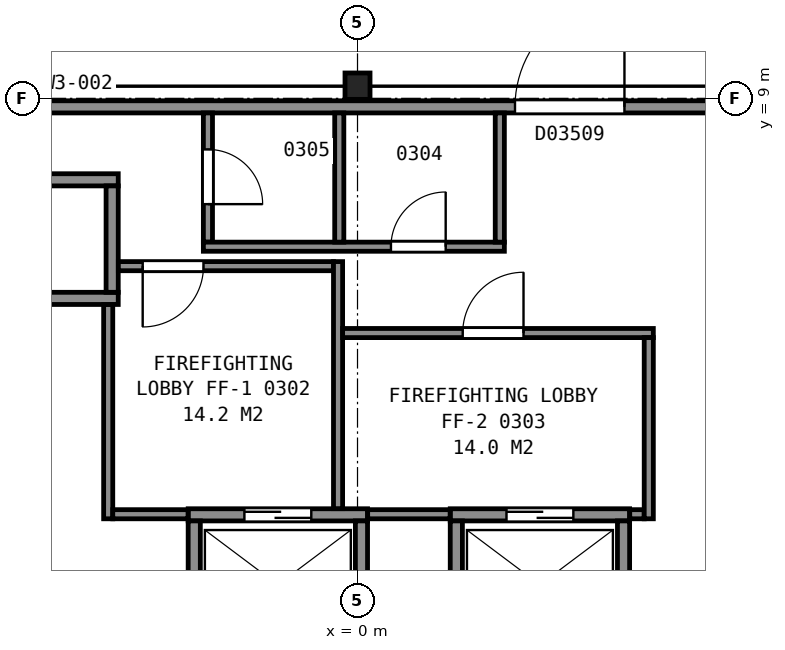
"""IFC4 building model, lengths in metres.
Left out: names, types, materials, properties, quantities, classifications, styles, units other than length and angle.
Written with IfcOpenShell. Run it as: python <this file> out.ifc"""

import sys

from ifc_helpers import new_model, si_unit, direction, frame, frame_2d, origin, origin_2d, place, context, subcontext, project, spatial, rectangle, i_section, extrude, element, fill, save


model = new_model("IFC4")
c1 = context("Model", 3, precision=1e-05, world=origin(), true_north=direction((0.0, 1.0)))
c2 = subcontext(c1, "Body", "Model", "MODEL_VIEW")
j1 = project(units=[si_unit("LENGTHUNIT", "METRE"), si_unit("PLANEANGLEUNIT", "RADIAN")], contexts=[c1])
p1 = place(None, origin())
s1 = spatial("IfcSite", under=j1, at=p1, CompositionType="ELEMENT")
p2 = place(p1, origin())
s2 = spatial("IfcBuilding", under=s1, at=p2, CompositionType="ELEMENT")
p3 = place(p2, frame((0.0, 0.0, 22.4)))
s3 = spatial("IfcBuildingStorey", under=s2, at=p3, CompositionType="ELEMENT", Elevation=22.4)
p4 = place(p3, frame((0.0, 9.2, 0.0), z_axis=(0.0, 0.0, 1.0), x_axis=(1.0, 0.0, 0.0)))
e1 = element("IfcColumn", 1, at=p4, inside=s3, PredefinedType="COLUMN", context=c2, shape_type="SweptSolid", body=[
    extrude(i_section(OverallWidth=0.411, OverallDepth=0.434, WebThickness=0.036, FlangeThickness=0.057, FilletRadius=0.015, at=origin_2d()), origin(), (0.0, 0.0, 1.0), 4.8),
])
p5 = place(p3, frame((-2.785, 2.15, 0.0), z_axis=(0.0, 0.0, 1.0), x_axis=(1.0, 0.0, 0.0)))
e2 = element("IfcWall", 2, at=p5, inside=s3, PredefinedType="PARTITIONING", context=c2, shape_type="SweptSolid", body=[
    extrude(rectangle(XDim=2.95, YDim=0.2, at=frame_2d((1.475, 0.0))), origin(), (0.0, 0.0, 1.0), 4.8),
])
p6 = place(p5, frame((0.925, 0.0, 0.0)))
e3 = element("IfcOpeningElement", 3, at=p6, cuts=e2, PredefinedType="OPENING", context=c2, shape_type="SweptSolid", body=[
    extrude(rectangle(XDim=1.1, YDim=2.1, at=frame_2d((0.55, 1.05))), frame((0.0, 0.11, 0.0), z_axis=(0.0, -1.0, 0.0), x_axis=(1.0, 0.0, 0.0)), (0.0, 0.0, 1.0), 0.22),
])
p7 = place(p3, frame((1.525, 2.15, 0.0), z_axis=(0.0, 0.0, 1.0), x_axis=(1.0, 0.0, 0.0)))
e4 = element("IfcWall", 4, at=p7, inside=s3, PredefinedType="PARTITIONING", context=c2, shape_type="SweptSolid", body=[
    extrude(rectangle(XDim=2.95, YDim=0.2, at=frame_2d((1.475, 0.0))), origin(), (0.0, 0.0, 1.0), 4.8),
])
p8 = place(p7, frame((0.925, 0.0, 0.0)))
e5 = element("IfcOpeningElement", 5, at=p8, cuts=e4, PredefinedType="OPENING", context=c2, shape_type="SweptSolid", body=[
    extrude(rectangle(XDim=1.1, YDim=2.1, at=frame_2d((0.55, 1.05))), frame((0.0, 0.11, 0.0), z_axis=(0.0, -1.0, 0.0), x_axis=(1.0, 0.0, 0.0)), (0.0, 0.0, 1.0), 0.22),
])
for number, where, z_axis, x_axis in (
    (6, (-6.285, 5.71, 0.0), (0.0, 0.0, 1.0), (1.0, 0.0, 0.0)),
    (7, (-6.285, 7.66, 0.0), (0.0, 0.0, 1.0), (1.0, 0.0, 0.0)),
):
    element("IfcWall", number, at=place(p3, frame(where, z_axis=z_axis, x_axis=x_axis)), inside=s3, PredefinedType="PARTITIONING", context=c2, shape_type="SweptSolid", body=[
        extrude(rectangle(XDim=2.35, YDim=0.2, at=frame_2d((1.175, 0.0))), origin(), (0.0, 0.0, 1.0), 4.8),
    ])
p9 = place(p3, frame((5.663, -1.612, 0.0), z_axis=(0.0, 0.0, 1.0), x_axis=(0.49998122708, 0.866036242063, 0.0)))
e8 = element("IfcWall", 8, at=p9, inside=s3, PredefinedType="PARTITIONING", context=c2, shape_type="SweptSolid", body=[
    extrude(rectangle(XDim=4.9, YDim=0.2, at=frame_2d((2.45, 0.0))), origin(), (0.0, 0.0, 1.0), 4.8),
])
for number, where, z_axis, x_axis in (
    (9, (4.375, 0.1, 0.0), (0.0, 0.0, 1.0), (0.0, 1.0, 0.0)),
    (10, (1.625, 0.1, 0.0), (0.0, 0.0, 1.0), (0.0, 1.0, 0.0)),
    (11, (0.065, 0.1, 0.0), (0.0, 0.0, 1.0), (0.0, 1.0, 0.0)),
    (12, (-2.685, 0.1, 0.0), (0.0, 0.0, 1.0), (0.0, 1.0, 0.0)),
):
    element("IfcWall", number, at=place(p3, frame(where, z_axis=z_axis, x_axis=x_axis)), inside=s3, PredefinedType="PARTITIONING", context=c2, shape_type="SweptSolid", body=[
        extrude(rectangle(XDim=1.95, YDim=0.2, at=frame_2d((0.975, 0.0))), origin(), (0.0, 0.0, 1.0), 4.8),
    ])
p10 = place(p3, frame((-4.035, 5.81, 0.0), z_axis=(0.0, 0.0, 1.0), x_axis=(0.0, 1.0, 0.0)))
e13 = element("IfcWall", 13, at=p10, inside=s3, PredefinedType="PARTITIONING", context=c2, shape_type="SweptSolid", body=[
    extrude(rectangle(XDim=1.75, YDim=0.2, at=frame_2d((0.875, 0.0))), origin(), (0.0, 0.0, 1.0), 4.8),
])
p11 = place(p3, frame((11.986, 8.86, 0.0), z_axis=(0.0, 0.0, 1.0), x_axis=(-1.0, 0.0, 0.0)))
e14 = element("IfcWall", 14, at=p11, inside=s3, PredefinedType="PARTITIONING", context=c2, shape_type="SweptSolid", body=[
    extrude(rectangle(XDim=23.967, YDim=0.2, at=frame_2d((11.983, 0.0))), origin(), (0.0, 0.0, 1.0), 4.55),
])
p12 = place(p11, frame((7.596, 0.0, 0.0)))
e15 = element("IfcOpeningElement", 15, at=p12, cuts=e14, PredefinedType="OPENING", context=c2, shape_type="SweptSolid", body=[
    extrude(rectangle(XDim=1.8, YDim=2.1, at=frame_2d((0.9, 1.05))), frame((0.0, 0.11, 0.0), z_axis=(0.0, -1.0, 0.0), x_axis=(1.0, 0.0, 0.0)), (0.0, 0.0, 1.0), 0.22),
])
p13 = place(p3, frame((-4.1, 2.085, 0.0), z_axis=(0.0, 0.0, 1.0), x_axis=(0.0, 1.0, 0.0)))
e16 = element("IfcWall", 16, at=p13, inside=s3, PredefinedType="PARTITIONING", context=c2, shape_type="SweptSolid", body=[
    extrude(rectangle(XDim=3.523, YDim=0.15, at=frame_2d((1.761, 0.0))), origin(), (0.0, 0.0, 1.0), 4.55),
])
p14 = place(p3, frame((-4.025, 2.16, 0.0), z_axis=(0.0, 0.0, 1.0), x_axis=(1.0, 0.0, 0.0)))
e17 = element("IfcWall", 17, at=p14, inside=s3, PredefinedType="PARTITIONING", context=c2, shape_type="SweptSolid", body=[
    extrude(rectangle(XDim=1.238, YDim=0.15, at=frame_2d((0.619, 0.0))), origin(), (0.0, 0.0, 1.0), 4.55),
])
p15 = place(p3, frame((-3.933, 6.24, 0.0), z_axis=(0.0, 0.0, 1.0), x_axis=(1.0, 0.0, 0.0)))
e18 = element("IfcWall", 18, at=p15, inside=s3, PredefinedType="PARTITIONING", context=c2, shape_type="SweptSolid", body=[
    extrude(rectangle(XDim=3.538, YDim=0.15, at=frame_2d((1.769, 0.0))), origin(), (0.0, 0.0, 1.0), 4.55),
])
p16 = place(p15, frame((0.4, 0.0, 0.0)))
e19 = element("IfcOpeningElement", 19, at=p16, cuts=e18, PredefinedType="OPENING", context=c2, shape_type="SweptSolid", body=[
    extrude(rectangle(XDim=1.0, YDim=2.1, at=frame_2d((0.5, 1.05))), frame((0.0, 0.085, 0.0), z_axis=(0.0, -1.0, 0.0), x_axis=(1.0, 0.0, 0.0)), (0.0, 0.0, 1.0), 0.17),
])
p17 = place(p3, frame((-2.46, 8.76, 0.0), z_axis=(0.0, 0.0, 1.0), x_axis=(0.0, -1.0, 0.0)))
e20 = element("IfcWall", 20, at=p17, inside=s3, PredefinedType="PARTITIONING", context=c2, shape_type="SweptSolid", body=[
    extrude(rectangle(XDim=2.125, YDim=0.15, at=frame_2d((1.062, 0.0))), origin(), (0.0, 0.0, 1.0), 4.55),
])
p18 = place(p17, frame((0.6, 0.0, 0.0)))
e21 = element("IfcOpeningElement", 21, at=p18, cuts=e20, PredefinedType="OPENING", context=c2, shape_type="SweptSolid", body=[
    extrude(rectangle(XDim=0.9, YDim=2.1, at=frame_2d((0.45, 1.05))), frame((0.0, 0.085, 0.0), z_axis=(0.0, -1.0, 0.0), x_axis=(1.0, 0.0, 0.0)), (0.0, 0.0, 1.0), 0.17),
])
p19 = place(p3, frame((-2.535, 6.56, 0.0), z_axis=(0.0, 0.0, 1.0), x_axis=(1.0, 0.0, 0.0)))
e22 = element("IfcWall", 22, at=p19, inside=s3, PredefinedType="PARTITIONING", context=c2, shape_type="SweptSolid", body=[
    extrude(rectangle(XDim=4.95, YDim=0.15, at=frame_2d((2.475, 0.0))), origin(), (0.0, 0.0, 1.0), 4.55),
])
p20 = place(p19, frame((3.085, 0.0, 0.0)))
e23 = element("IfcOpeningElement", 23, at=p20, cuts=e22, PredefinedType="OPENING", context=c2, shape_type="SweptSolid", body=[
    extrude(rectangle(XDim=0.9, YDim=2.1, at=frame_2d((0.45, 1.05))), frame((0.0, 0.085, 0.0), z_axis=(0.0, -1.0, 0.0), x_axis=(1.0, 0.0, 0.0)), (0.0, 0.0, 1.0), 0.17),
])
p21 = place(p3, frame((-0.32, 2.252, 0.0), z_axis=(0.0, 0.0, 1.0), x_axis=(0.0, 1.0, 0.0)))
e24 = element("IfcWall", 24, at=p21, inside=s3, PredefinedType="PARTITIONING", context=c2, shape_type="SweptSolid", body=[
    extrude(rectangle(XDim=4.063, YDim=0.15, at=frame_2d((2.031, 0.0))), origin(), (0.0, 0.0, 1.0), 4.55),
])
p22 = place(p3, frame((-0.245, 5.14, 0.0), z_axis=(0.0, 0.0, 1.0), x_axis=(1.0, 0.0, 0.0)))
e25 = element("IfcWall", 25, at=p22, inside=s3, PredefinedType="PARTITIONING", context=c2, shape_type="SweptSolid", body=[
    extrude(rectangle(XDim=5.11, YDim=0.15, at=frame_2d((2.555, 0.0))), origin(), (0.0, 0.0, 1.0), 4.55),
])
p23 = place(p22, frame((1.975, 0.0, 0.0)))
e26 = element("IfcOpeningElement", 26, at=p23, cuts=e25, PredefinedType="OPENING", context=c2, shape_type="SweptSolid", body=[
    extrude(rectangle(XDim=1.0, YDim=2.1, at=frame_2d((0.5, 1.05))), frame((0.0, 0.085, 0.0), z_axis=(0.0, -1.0, 0.0), x_axis=(1.0, 0.0, 0.0)), (0.0, 0.0, 1.0), 0.17),
])
p24 = place(p3, frame((-0.3, 6.635, 0.0), z_axis=(0.0, 0.0, 1.0), x_axis=(0.0, 1.0, 0.0)))
e27 = element("IfcWall", 27, at=p24, inside=s3, PredefinedType="PARTITIONING", context=c2, shape_type="SweptSolid", body=[
    extrude(rectangle(XDim=2.125, YDim=0.15, at=frame_2d((1.062, 0.0))), origin(), (0.0, 0.0, 1.0), 4.55),
])
p25 = place(p3, frame((0.167, 2.16, 0.0), z_axis=(0.0, 0.0, 1.0), x_axis=(1.0, 0.0, 0.0)))
e28 = element("IfcWall", 28, at=p25, inside=s3, PredefinedType="PARTITIONING", context=c2, shape_type="SweptSolid", body=[
    extrude(rectangle(XDim=1.356, YDim=0.15, at=frame_2d((0.678, 0.0))), origin(), (0.0, 0.0, 1.0), 4.55),
])
p26 = place(p3, frame((2.34, 6.635, 0.0), z_axis=(0.0, 0.0, 1.0), x_axis=(0.0, 1.0, 0.0)))
e29 = element("IfcWall", 29, at=p26, inside=s3, PredefinedType="PARTITIONING", context=c2, shape_type="SweptSolid", body=[
    extrude(rectangle(XDim=2.125, YDim=0.15, at=frame_2d((1.062, 0.0))), origin(), (0.0, 0.0, 1.0), 4.55),
])
p27 = place(p3, frame((3.403, -11.826, 0.0), z_axis=(0.0, 0.0, 1.0), x_axis=(0.499990831429, 0.866030697196, 0.0)))
e30 = element("IfcWall", 30, at=p27, inside=s3, PredefinedType="PARTITIONING", context=c2, shape_type="SweptSolid", body=[
    extrude(rectangle(XDim=20.526, YDim=0.2, at=frame_2d((10.263, 0.0))), origin(), (0.0, 0.0, 1.0), 4.55),
])
p28 = place(p27, frame((10.0, 0.0, 0.0)))
e31 = element("IfcOpeningElement", 31, at=p28, cuts=e30, PredefinedType="OPENING", context=c2, shape_type="SweptSolid", body=[
    extrude(rectangle(XDim=1.8, YDim=2.1, at=frame_2d((0.9, 1.05))), frame((0.0, 0.11, 0.0), z_axis=(0.0, -1.0, 0.0), x_axis=(1.0, 0.0, 0.0)), (0.0, 0.0, 1.0), 0.22),
])
p29 = place(p3, frame((4.477, 2.16, 0.0), z_axis=(0.0, 0.0, 1.0), x_axis=(1.0, 0.0, 0.0)))
e32 = element("IfcWall", 32, at=p29, inside=s3, PredefinedType="PARTITIONING", context=c2, shape_type="SweptSolid", body=[
    extrude(rectangle(XDim=0.238, YDim=0.15, at=frame_2d((0.119, 0.0))), origin(), (0.0, 0.0, 1.0), 4.55),
])
p30 = place(p3, frame((4.79, 2.085, 0.0), z_axis=(0.0, 0.0, 1.0), x_axis=(0.0, 1.0, 0.0)))
e33 = element("IfcWall", 33, at=p30, inside=s3, PredefinedType="PARTITIONING", context=c2, shape_type="SweptSolid", body=[
    extrude(rectangle(XDim=2.98, YDim=0.15, at=frame_2d((1.49, 0.0))), origin(), (0.0, 0.0, 1.0), 4.55),
])
p31 = place(p3, frame((-4.438, -20.054, 0.0), z_axis=(0.0, 0.0, 1.0), x_axis=(-0.499994028088, 0.866028851642, 0.0)))
e34 = element("IfcWall", 34, at=p31, inside=s3, PredefinedType="PARTITIONING", context=c2, shape_type="SweptSolid", body=[
    extrude(rectangle(XDim=30.297, YDim=0.125, at=frame_2d((15.148, 0.0))), origin(), (0.0, 0.0, 1.0), 3.653),
])
p32 = place(p31, frame((26.285, 0.0, 0.0)))
e35 = element("IfcOpeningElement", 35, at=p32, cuts=e34, PredefinedType="OPENING", context=c2, shape_type="SweptSolid", body=[
    extrude(rectangle(XDim=1.2, YDim=2.1, at=frame_2d((0.6, 1.05))), frame((0.0, 0.073, 0.0), z_axis=(0.0, -1.0, 0.0), x_axis=(1.0, 0.0, 0.0)), (0.0, 0.0, 1.0), 0.145),
])
p33 = place(p31, frame((18.731, 0.0, 0.0)))
e36 = element("IfcOpeningElement", 36, at=p33, cuts=e34, PredefinedType="OPENING", context=c2, shape_type="SweptSolid", body=[
    extrude(rectangle(XDim=1.2, YDim=2.1, at=frame_2d((0.6, 1.05))), frame((0.0, 0.073, 0.0), z_axis=(0.0, -1.0, 0.0), x_axis=(1.0, 0.0, 0.0)), (0.0, 0.0, 1.0), 0.145),
])
p34 = place(p31, frame((10.449, 0.0, 0.0)))
e37 = element("IfcOpeningElement", 37, at=p34, cuts=e34, PredefinedType="OPENING", context=c2, shape_type="SweptSolid", body=[
    extrude(rectangle(XDim=1.0, YDim=2.1, at=frame_2d((0.5, 1.05))), frame((0.0, 0.073, 0.0), z_axis=(0.0, -1.0, 0.0), x_axis=(1.0, 0.0, 0.0)), (0.0, 0.0, 1.0), 0.145),
])
p35 = place(p31, frame((2.816, 0.0, 0.0)))
e38 = element("IfcOpeningElement", 38, at=p35, cuts=e34, PredefinedType="OPENING", context=c2, shape_type="SweptSolid", body=[
    extrude(rectangle(XDim=1.2, YDim=2.1, at=frame_2d((0.6, 1.05))), frame((0.0, 0.073, 0.0), z_axis=(0.0, -1.0, 0.0), x_axis=(1.0, 0.0, 0.0)), (0.0, 0.0, 1.0), 0.145),
])
p36 = place(p3, frame((19.586, 6.184, 0.0), z_axis=(0.0, 0.0, 1.0), x_axis=(-0.499994028088, -0.866028851642, 0.0)))
e39 = element("IfcWall", 39, at=p36, inside=s3, PredefinedType="PARTITIONING", context=c2, shape_type="SweptSolid", body=[
    extrude(rectangle(XDim=30.297, YDim=0.125, at=frame_2d((15.148, 0.0))), origin(), (0.0, 0.0, 1.0), 3.653),
])
p37 = place(p36, frame((23.885, 0.0, 0.0)))
e40 = element("IfcOpeningElement", 40, at=p37, cuts=e39, PredefinedType="OPENING", context=c2, shape_type="SweptSolid", body=[
    extrude(rectangle(XDim=1.8, YDim=2.4, at=frame_2d((0.9, 1.2))), frame((0.0, 0.073, 0.0), z_axis=(0.0, -1.0, 0.0), x_axis=(1.0, 0.0, 0.0)), (0.0, 0.0, 1.0), 0.145),
])
p38 = place(p36, frame((16.741, 0.0, 0.0)))
e41 = element("IfcOpeningElement", 41, at=p38, cuts=e39, PredefinedType="OPENING", context=c2, shape_type="SweptSolid", body=[
    extrude(rectangle(XDim=1.0, YDim=2.1, at=frame_2d((0.5, 1.05))), frame((0.0, 0.073, 0.0), z_axis=(0.0, -1.0, 0.0), x_axis=(1.0, 0.0, 0.0)), (0.0, 0.0, 1.0), 0.145),
])
p39 = place(p36, frame((10.349, 0.0, 0.0)))
e42 = element("IfcOpeningElement", 42, at=p39, cuts=e39, PredefinedType="OPENING", context=c2, shape_type="SweptSolid", body=[
    extrude(rectangle(XDim=1.2, YDim=2.1, at=frame_2d((0.6, 1.05))), frame((0.0, 0.073, 0.0), z_axis=(0.0, -1.0, 0.0), x_axis=(1.0, 0.0, 0.0)), (0.0, 0.0, 1.0), 0.145),
])
p40 = place(p36, frame((2.817, 0.0, 0.0)))
e43 = element("IfcOpeningElement", 43, at=p40, cuts=e39, PredefinedType="OPENING", context=c2, shape_type="SweptSolid", body=[
    extrude(rectangle(XDim=1.2, YDim=2.1, at=frame_2d((0.6, 1.05))), frame((0.0, 0.073, 0.0), z_axis=(0.0, -1.0, 0.0), x_axis=(1.0, 0.0, 0.0)), (0.0, 0.0, 1.0), 0.145),
])
p41 = place(p6, origin())
e44 = element("IfcDoor", 44, at=p41, inside=s3, OperationType="SLIDING_TO_LEFT", PredefinedType="DOOR", context=c2, shape_type="SweptSolid", body=[
    extrude(rectangle(XDim=1.1, YDim=2.1, at=frame_2d((0.55, 1.05))), frame((0.0, 0.025, 0.0), z_axis=(0.0, -1.0, 0.0), x_axis=(1.0, 0.0, 0.0)), (0.0, 0.0, 1.0), 0.05),
])
fill(e3, e44)
p42 = place(p8, origin())
e45 = element("IfcDoor", 45, at=p42, inside=s3, OperationType="SLIDING_TO_RIGHT", PredefinedType="DOOR", context=c2, shape_type="SweptSolid", body=[
    extrude(rectangle(XDim=1.1, YDim=2.1, at=frame_2d((0.55, 1.05))), frame((0.0, 0.025, 0.0), z_axis=(0.0, -1.0, 0.0), x_axis=(1.0, 0.0, 0.0)), (0.0, 0.0, 1.0), 0.05),
])
fill(e5, e45)
p43 = place(p12, origin())
e46 = element("IfcDoor", 46, at=p43, inside=s3, OperationType="DOUBLE_DOOR_SINGLE_SWING", PredefinedType="DOOR", context=c2, shape_type="SweptSolid", body=[
    extrude(rectangle(XDim=1.8, YDim=2.1, at=frame_2d((0.9, 1.05))), frame((0.0, 0.025, 0.0), z_axis=(0.0, -1.0, 0.0), x_axis=(1.0, 0.0, 0.0)), (0.0, 0.0, 1.0), 0.05),
])
fill(e15, e46)
p44 = place(p16, origin())
e47 = element("IfcDoor", 47, at=p44, inside=s3, OperationType="SINGLE_SWING_LEFT", PredefinedType="DOOR", context=c2, shape_type="SweptSolid", body=[
    extrude(rectangle(XDim=1.0, YDim=2.1, at=frame_2d((0.5, 1.05))), frame((0.0, 0.025, 0.0), z_axis=(0.0, -1.0, 0.0), x_axis=(1.0, 0.0, 0.0)), (0.0, 0.0, 1.0), 0.05),
])
fill(e19, e47)
p45 = place(p18, origin())
e48 = element("IfcDoor", 48, at=p45, inside=s3, OperationType="SINGLE_SWING_RIGHT", PredefinedType="DOOR", context=c2, shape_type="SweptSolid", body=[
    extrude(rectangle(XDim=0.9, YDim=2.1, at=frame_2d((0.45, 1.05))), frame((0.0, 0.025, 0.0), z_axis=(0.0, -1.0, 0.0), x_axis=(1.0, 0.0, 0.0)), (0.0, 0.0, 1.0), 0.05),
])
fill(e21, e48)
p46 = place(p20, origin())
e49 = element("IfcDoor", 49, at=p46, inside=s3, OperationType="SINGLE_SWING_RIGHT", PredefinedType="DOOR", context=c2, shape_type="SweptSolid", body=[
    extrude(rectangle(XDim=0.9, YDim=2.1, at=frame_2d((0.45, 1.05))), frame((0.0, 0.025, 0.0), z_axis=(0.0, -1.0, 0.0), x_axis=(1.0, 0.0, 0.0)), (0.0, 0.0, 1.0), 0.05),
])
fill(e23, e49)
p47 = place(p23, origin())
e50 = element("IfcDoor", 50, at=p47, inside=s3, OperationType="SINGLE_SWING_RIGHT", PredefinedType="DOOR", context=c2, shape_type="SweptSolid", body=[
    extrude(rectangle(XDim=1.0, YDim=2.1, at=frame_2d((0.5, 1.05))), frame((0.0, 0.025, 0.0), z_axis=(0.0, -1.0, 0.0), x_axis=(1.0, 0.0, 0.0)), (0.0, 0.0, 1.0), 0.05),
])
fill(e26, e50)
save(model, sys.argv[1])
